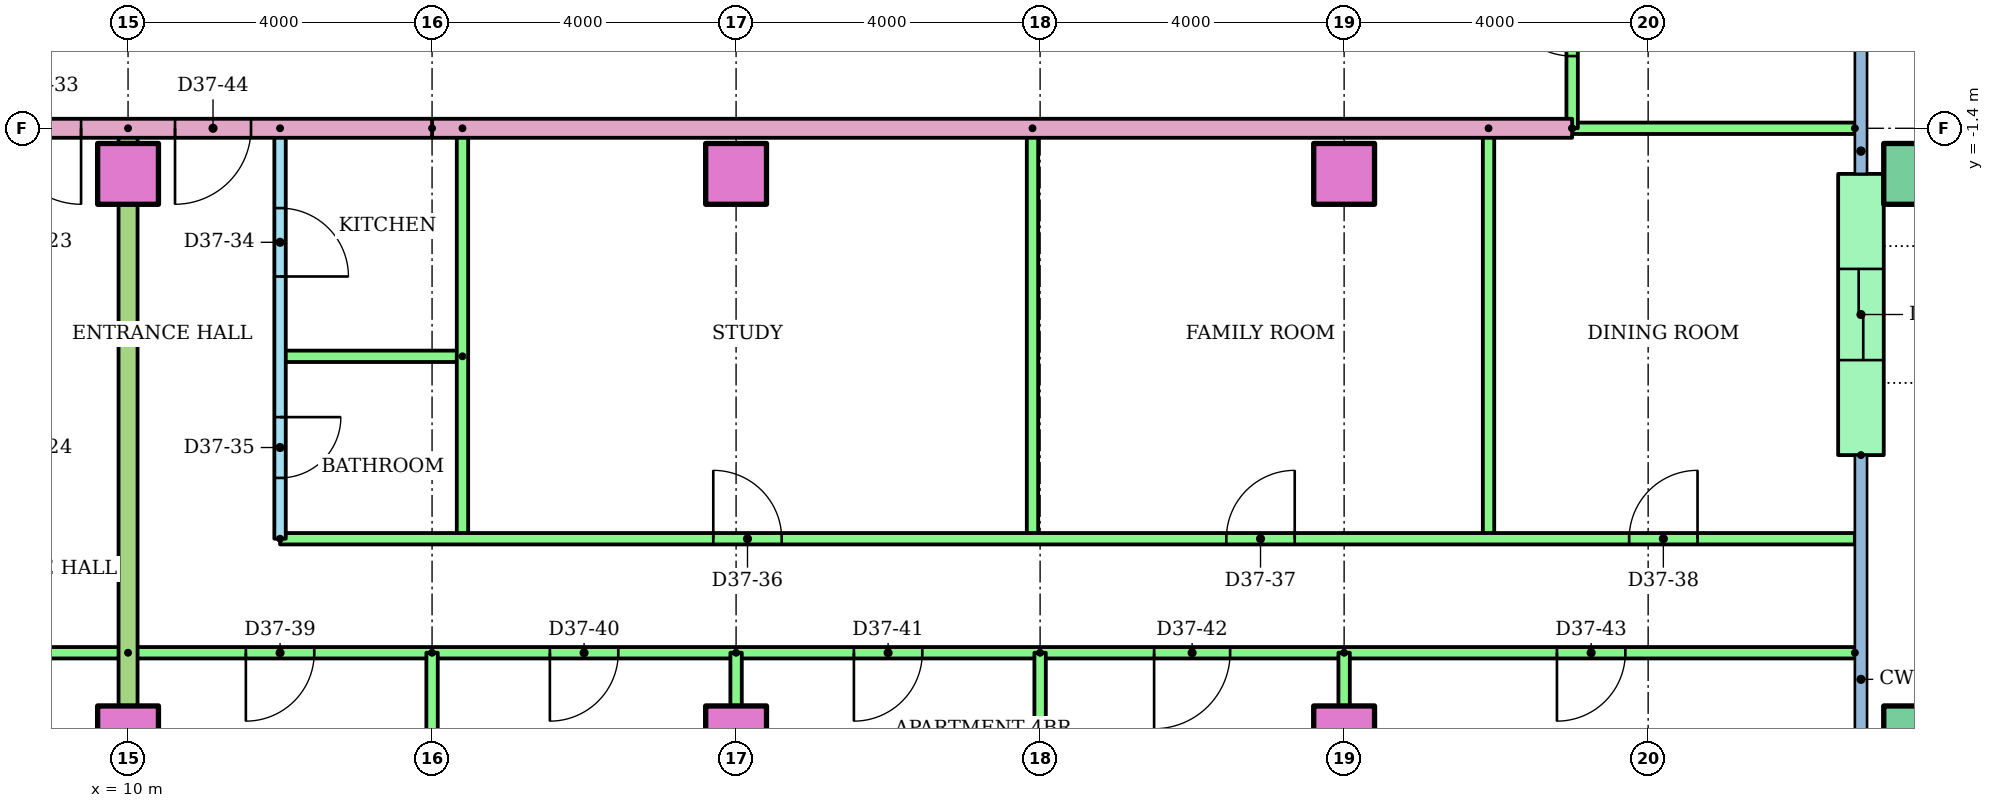
"""IFC4 building model, lengths in metres.
Left out: names, types, materials, properties, quantities, classifications, styles, units other than length and angle.
Written with IfcOpenShell. Run it as: python <this file> out.ifc"""

import sys

from ifc_helpers import new_model, si_unit, direction, frame, frame_2d, origin, origin_2d, place, context, subcontext, project, spatial, rectangle, hollow_rectangle, extrude, element, fill, save


model = new_model("IFC4")
c1 = context("Model", 3, precision=1e-05, world=origin(), true_north=direction((0.0, 1.0)))
c2 = subcontext(c1, "Body", "Model", "MODEL_VIEW")
j1 = project(units=[si_unit("LENGTHUNIT", "METRE"), si_unit("PLANEANGLEUNIT", "RADIAN")], contexts=[c1])
p1 = place(None, origin())
s1 = spatial("IfcSite", under=j1, at=p1, CompositionType="ELEMENT")
p2 = place(p1, origin())
s2 = spatial("IfcBuilding", under=s1, at=p2, CompositionType="ELEMENT")
p3 = place(p2, frame((0.0, 0.0, 142.2)))
s3 = spatial("IfcBuildingStorey", under=s2, at=p3, CompositionType="ELEMENT", Elevation=142.2)
for number, where in (
    (1, (10.0, -9.4, 0.0)),
    (2, (18.0, -9.4, 0.0)),
    (3, (26.0, -9.4, 0.0)),
):
    element("IfcColumn", number, at=place(p3, frame(where)), inside=s3, PredefinedType="COLUMN", context=c2, shape_type="SweptSolid", body=[
        extrude(rectangle(XDim=0.8, YDim=0.8, at=origin_2d()), origin(), (0.0, 0.0, 1.0), 3.2),
    ])
p4 = place(p3, frame((33.5, -9.4, 0.0)))
e4 = element("IfcColumn", 4, at=p4, inside=s3, PredefinedType="COLUMN", context=c2, shape_type="SweptSolid", body=[
    extrude(hollow_rectangle(XDim=0.8, YDim=0.8, WallThickness=0.04, at=origin_2d()), origin(), (0.0, 0.0, 1.0), 3.2),
])
for number, where in (
    (5, (10.0, -2.0, 0.0)),
    (6, (18.0, -2.0, 0.0)),
    (7, (26.0, -2.0, 0.0)),
):
    element("IfcColumn", number, at=place(p3, frame(where)), inside=s3, PredefinedType="COLUMN", context=c2, shape_type="SweptSolid", body=[
        extrude(rectangle(XDim=0.8, YDim=0.8, at=origin_2d()), origin(), (0.0, 0.0, 1.0), 3.2),
    ])
p5 = place(p3, frame((33.5, -2.0, 0.0)))
e8 = element("IfcColumn", 8, at=p5, inside=s3, PredefinedType="COLUMN", context=c2, shape_type="SweptSolid", body=[
    extrude(hollow_rectangle(XDim=0.8, YDim=0.8, WallThickness=0.04, at=origin_2d()), origin(), (0.0, 0.0, 1.0), 3.2),
])
p6 = place(p3, frame((32.8, -5.7, 0.0), z_axis=(0.0, 0.0, 1.0), x_axis=(0.0, 1.0, 0.0)))
e9 = element("IfcWall", 9, at=p6, inside=s3, PredefinedType="STANDARD", context=c2, shape_type="SweptSolid", body=[
    extrude(rectangle(XDim=3.7, YDim=0.6, at=frame_2d((1.85, 0.0))), origin(), (0.0, 0.0, 1.0), 2.92),
])
p7 = place(p6, frame((1.25, 0.0, 0.0)))
e10 = element("IfcOpeningElement", 10, at=p7, cuts=e9, PredefinedType="OPENING", context=c2, shape_type="SweptSolid", body=[
    extrude(rectangle(XDim=1.2, YDim=2.1, at=frame_2d((0.6, 1.05))), frame((0.0, 0.31, 0.0), z_axis=(0.0, -1.0, 0.0), x_axis=(1.0, 0.0, 0.0)), (0.0, 0.0, 1.0), 0.62),
])
p8 = place(p3, frame((10.0, -8.3, 0.0), z_axis=(0.0, 0.0, 1.0), x_axis=(-1.0, 0.0, 0.0)))
e11 = element("IfcWall", 11, at=p8, inside=s3, PredefinedType="PARTITIONING", context=c2, shape_type="SweptSolid", body=[
    extrude(rectangle(XDim=24.0, YDim=0.15, at=frame_2d((12.0, 0.0))), origin(), (0.0, 0.0, 1.0), 2.4),
])
p9 = place(p8, frame((19.5, 0.0, 0.0)))
e12 = element("IfcOpeningElement", 12, at=p9, cuts=e11, PredefinedType="OPENING", context=c2, shape_type="SweptSolid", body=[
    extrude(rectangle(XDim=1.0, YDim=2.1, at=frame_2d((0.5, 1.05))), frame((0.0, 0.085, 0.0), z_axis=(0.0, -1.0, 0.0), x_axis=(1.0, 0.0, 0.0)), (0.0, 0.0, 1.0), 0.17),
])
p10 = place(p8, frame((13.55, 0.0, 0.0)))
e13 = element("IfcOpeningElement", 13, at=p10, cuts=e11, PredefinedType="OPENING", context=c2, shape_type="SweptSolid", body=[
    extrude(rectangle(XDim=0.9, YDim=2.1, at=frame_2d((0.45, 1.05))), frame((0.0, 0.085, 0.0), z_axis=(0.0, -1.0, 0.0), x_axis=(1.0, 0.0, 0.0)), (0.0, 0.0, 1.0), 0.17),
])
p11 = place(p8, frame((9.55, 0.0, 0.0)))
e14 = element("IfcOpeningElement", 14, at=p11, cuts=e11, PredefinedType="OPENING", context=c2, shape_type="SweptSolid", body=[
    extrude(rectangle(XDim=0.9, YDim=2.1, at=frame_2d((0.45, 1.05))), frame((0.0, 0.085, 0.0), z_axis=(0.0, -1.0, 0.0), x_axis=(1.0, 0.0, 0.0)), (0.0, 0.0, 1.0), 0.17),
])
p12 = place(p8, frame((5.55, 0.0, 0.0)))
e15 = element("IfcOpeningElement", 15, at=p12, cuts=e11, PredefinedType="OPENING", context=c2, shape_type="SweptSolid", body=[
    extrude(rectangle(XDim=0.9, YDim=2.1, at=frame_2d((0.45, 1.05))), frame((0.0, 0.085, 0.0), z_axis=(0.0, -1.0, 0.0), x_axis=(1.0, 0.0, 0.0)), (0.0, 0.0, 1.0), 0.17),
])
p13 = place(p8, frame((1.55, 0.0, 0.0)))
e16 = element("IfcOpeningElement", 16, at=p13, cuts=e11, PredefinedType="OPENING", context=c2, shape_type="SweptSolid", body=[
    extrude(rectangle(XDim=0.9, YDim=2.1, at=frame_2d((0.45, 1.05))), frame((0.0, 0.085, 0.0), z_axis=(0.0, -1.0, 0.0), x_axis=(1.0, 0.0, 0.0)), (0.0, 0.0, 1.0), 0.17),
])
p14 = place(p3, frame((12.0, -1.4, 0.0), z_axis=(0.0, 0.0, 1.0), x_axis=(0.0, -1.0, 0.0)))
e17 = element("IfcWall", 17, at=p14, inside=s3, PredefinedType="PARTITIONING", context=c2, shape_type="SweptSolid", body=[
    extrude(rectangle(XDim=5.4, YDim=0.15, at=frame_2d((2.7, 0.0))), origin(), (0.0, 0.0, 1.0), 2.4),
])
p15 = place(p14, frame((1.05, 0.0, 0.0)))
e18 = element("IfcOpeningElement", 18, at=p15, cuts=e17, PredefinedType="OPENING", context=c2, shape_type="SweptSolid", body=[
    extrude(rectangle(XDim=0.9, YDim=2.1, at=frame_2d((0.45, 1.05))), frame((0.0, 0.085, 0.0), z_axis=(0.0, -1.0, 0.0), x_axis=(1.0, 0.0, 0.0)), (0.0, 0.0, 1.0), 0.17),
])
p16 = place(p14, frame((3.8, 0.0, 0.0)))
e19 = element("IfcOpeningElement", 19, at=p16, cuts=e17, PredefinedType="OPENING", context=c2, shape_type="SweptSolid", body=[
    extrude(rectangle(XDim=0.8, YDim=2.1, at=frame_2d((0.4, 1.05))), frame((0.0, 0.085, 0.0), z_axis=(0.0, -1.0, 0.0), x_axis=(1.0, 0.0, 0.0)), (0.0, 0.0, 1.0), 0.17),
])
p17 = place(p3, frame((14.4, -4.4, 0.0), z_axis=(0.0, 0.0, 1.0), x_axis=(-1.0, 0.0, 0.0)))
e20 = element("IfcWall", 20, at=p17, inside=s3, PredefinedType="PARTITIONING", context=c2, shape_type="SweptSolid", body=[
    extrude(rectangle(XDim=2.4, YDim=0.15, at=frame_2d((1.2, 0.0))), origin(), (0.0, 0.0, 1.0), 2.4),
])
for number, where, z_axis, x_axis in (
    (21, (14.4, -1.4, 0.0), (0.0, 0.0, 1.0), (0.0, -1.0, 0.0)),
    (22, (21.9, -1.4, 0.0), (0.0, 0.0, 1.0), (0.0, -1.0, 0.0)),
    (23, (27.9, -1.4, 0.0), (0.0, 0.0, 1.0), (0.0, -1.0, 0.0)),
):
    element("IfcWall", number, at=place(p3, frame(where, z_axis=z_axis, x_axis=x_axis)), inside=s3, PredefinedType="PARTITIONING", context=c2, shape_type="SweptSolid", body=[
        extrude(rectangle(XDim=5.4, YDim=0.15, at=frame_2d((2.7, 0.0))), origin(), (0.0, 0.0, 1.0), 2.4),
    ])
p18 = place(p3, frame((12.0, -6.8, 0.0)))
e24 = element("IfcWall", 24, at=p18, inside=s3, PredefinedType="PARTITIONING", context=c2, shape_type="SweptSolid", body=[
    extrude(rectangle(XDim=20.72, YDim=0.15, at=frame_2d((10.36, 0.0))), origin(), (0.0, 0.0, 1.0), 2.4),
])
p19 = place(p18, frame((5.7, 0.0, 0.0)))
e25 = element("IfcOpeningElement", 25, at=p19, cuts=e24, PredefinedType="OPENING", context=c2, shape_type="SweptSolid", body=[
    extrude(rectangle(XDim=0.9, YDim=2.1, at=frame_2d((0.45, 1.05))), frame((0.0, 0.085, 0.0), z_axis=(0.0, -1.0, 0.0), x_axis=(1.0, 0.0, 0.0)), (0.0, 0.0, 1.0), 0.17),
])
p20 = place(p18, frame((12.45, 0.0, 0.0)))
e26 = element("IfcOpeningElement", 26, at=p20, cuts=e24, PredefinedType="OPENING", context=c2, shape_type="SweptSolid", body=[
    extrude(rectangle(XDim=0.9, YDim=2.1, at=frame_2d((0.45, 1.05))), frame((0.0, 0.085, 0.0), z_axis=(0.0, -1.0, 0.0), x_axis=(1.0, 0.0, 0.0)), (0.0, 0.0, 1.0), 0.17),
])
p21 = place(p18, frame((17.75, 0.0, 0.0)))
e27 = element("IfcOpeningElement", 27, at=p21, cuts=e24, PredefinedType="OPENING", context=c2, shape_type="SweptSolid", body=[
    extrude(rectangle(XDim=0.9, YDim=2.1, at=frame_2d((0.45, 1.05))), frame((0.0, 0.085, 0.0), z_axis=(0.0, -1.0, 0.0), x_axis=(1.0, 0.0, 0.0)), (0.0, 0.0, 1.0), 0.17),
])
p22 = place(p3, frame((32.72, -8.3, 0.0), z_axis=(0.0, 0.0, 1.0), x_axis=(-1.0, 0.0, 0.0)))
e28 = element("IfcWall", 28, at=p22, inside=s3, PredefinedType="PARTITIONING", context=c2, shape_type="SweptSolid", body=[
    extrude(rectangle(XDim=22.72, YDim=0.15, at=frame_2d((11.36, 0.0))), origin(), (0.0, 0.0, 1.0), 2.4),
])
p23 = place(p22, frame((20.27, 0.0, 0.0)))
e29 = element("IfcOpeningElement", 29, at=p23, cuts=e28, PredefinedType="OPENING", context=c2, shape_type="SweptSolid", body=[
    extrude(rectangle(XDim=0.9, YDim=2.1, at=frame_2d((0.45, 1.05))), frame((0.0, 0.085, 0.0), z_axis=(0.0, -1.0, 0.0), x_axis=(1.0, 0.0, 0.0)), (0.0, 0.0, 1.0), 0.17),
])
p24 = place(p22, frame((16.27, 0.0, 0.0)))
e30 = element("IfcOpeningElement", 30, at=p24, cuts=e28, PredefinedType="OPENING", context=c2, shape_type="SweptSolid", body=[
    extrude(rectangle(XDim=0.9, YDim=2.1, at=frame_2d((0.45, 1.05))), frame((0.0, 0.085, 0.0), z_axis=(0.0, -1.0, 0.0), x_axis=(1.0, 0.0, 0.0)), (0.0, 0.0, 1.0), 0.17),
])
p25 = place(p22, frame((12.27, 0.0, 0.0)))
e31 = element("IfcOpeningElement", 31, at=p25, cuts=e28, PredefinedType="OPENING", context=c2, shape_type="SweptSolid", body=[
    extrude(rectangle(XDim=0.9, YDim=2.1, at=frame_2d((0.45, 1.05))), frame((0.0, 0.085, 0.0), z_axis=(0.0, -1.0, 0.0), x_axis=(1.0, 0.0, 0.0)), (0.0, 0.0, 1.0), 0.17),
])
p26 = place(p22, frame((8.22, 0.0, 0.0)))
e32 = element("IfcOpeningElement", 32, at=p26, cuts=e28, PredefinedType="OPENING", context=c2, shape_type="SweptSolid", body=[
    extrude(rectangle(XDim=1.0, YDim=2.1, at=frame_2d((0.5, 1.05))), frame((0.0, 0.085, 0.0), z_axis=(0.0, -1.0, 0.0), x_axis=(1.0, 0.0, 0.0)), (0.0, 0.0, 1.0), 0.17),
])
p27 = place(p22, frame((3.02, 0.0, 0.0)))
e33 = element("IfcOpeningElement", 33, at=p27, cuts=e28, PredefinedType="OPENING", context=c2, shape_type="SweptSolid", body=[
    extrude(rectangle(XDim=0.9, YDim=2.1, at=frame_2d((0.45, 1.05))), frame((0.0, 0.085, 0.0), z_axis=(0.0, -1.0, 0.0), x_axis=(1.0, 0.0, 0.0)), (0.0, 0.0, 1.0), 0.17),
])
p28 = place(p3, frame((14.0, -8.3, 0.0), z_axis=(0.0, 0.0, 1.0), x_axis=(0.0, -1.0, 0.0)))
e34 = element("IfcWall", 34, at=p28, inside=s3, PredefinedType="PARTITIONING", context=c2, shape_type="SweptSolid", body=[
    extrude(rectangle(XDim=8.021, YDim=0.15, at=frame_2d((4.01, 0.0))), origin(), (0.0, 0.0, 1.0), 2.4),
])
p29 = place(p3, frame((18.0, -8.3, 0.0), z_axis=(0.0, 0.0, 1.0), x_axis=(0.0, -1.0, 0.0)))
e35 = element("IfcWall", 35, at=p29, inside=s3, PredefinedType="PARTITIONING", context=c2, shape_type="SweptSolid", body=[
    extrude(rectangle(XDim=8.01, YDim=0.15, at=frame_2d((4.005, 0.0))), origin(), (0.0, 0.0, 1.0), 2.4),
])
p30 = place(p3, frame((22.0, -8.3, 0.0), z_axis=(0.0, 0.0, 1.0), x_axis=(0.0, -1.0, 0.0)))
e36 = element("IfcWall", 36, at=p30, inside=s3, PredefinedType="PARTITIONING", context=c2, shape_type="SweptSolid", body=[
    extrude(rectangle(XDim=8.021, YDim=0.15, at=frame_2d((4.01, 0.0))), origin(), (0.0, 0.0, 1.0), 2.4),
])
p31 = place(p3, frame((26.0, -8.3, 0.0), z_axis=(0.0, 0.0, 1.0), x_axis=(0.0, -1.0, 0.0)))
e37 = element("IfcWall", 37, at=p31, inside=s3, PredefinedType="PARTITIONING", context=c2, shape_type="SweptSolid", body=[
    extrude(rectangle(XDim=8.01, YDim=0.15, at=frame_2d((4.005, 0.0))), origin(), (0.0, 0.0, 1.0), 2.4),
])
p32 = place(p3, frame((10.0, -1.4, 0.0), z_axis=(0.0, 0.0, 1.0), x_axis=(0.0, -1.0, 0.0)))
e38 = element("IfcWall", 38, at=p32, inside=s3, PredefinedType="PARTITIONING", context=c2, shape_type="SweptSolid", body=[
    extrude(rectangle(XDim=14.91, YDim=0.25, at=frame_2d((7.455, 0.0))), origin(), (0.0, 0.0, 1.0), 2.4),
])
p33 = place(p3, frame((29.0, -1.4, 0.0), z_axis=(0.0, 0.0, 1.0), x_axis=(-1.0, 0.0, 0.0)))
e39 = element("IfcWall", 39, at=p33, inside=s3, PredefinedType="PARTITIONING", context=c2, shape_type="SweptSolid", body=[
    extrude(rectangle(XDim=15.0, YDim=0.25, at=frame_2d((7.5, 0.0))), origin(), (0.0, 0.0, 1.0), 2.4),
])
p34 = place(p3, frame((32.72, -1.4, 0.0), z_axis=(0.0, 0.0, 1.0), x_axis=(-1.0, 0.0, 0.0)))
e40 = element("IfcWall", 40, at=p34, inside=s3, PredefinedType="PARTITIONING", context=c2, shape_type="SweptSolid", body=[
    extrude(rectangle(XDim=3.72, YDim=0.15, at=frame_2d((1.86, 0.0))), origin(), (0.0, 0.0, 1.0), 2.4),
])
p35 = place(p3, frame((29.0, -1.4, 0.0), z_axis=(0.0, 0.0, 1.0), x_axis=(0.0, 1.0, 0.0)))
e41 = element("IfcWall", 41, at=p35, inside=s3, PredefinedType="PARTITIONING", context=c2, shape_type="SweptSolid", body=[
    extrude(rectangle(XDim=2.8, YDim=0.15, at=frame_2d((1.4, 0.0))), origin(), (0.0, 0.0, 1.0), 2.4),
])
p36 = place(p35, frame((0.95, 0.0, 0.0)))
e42 = element("IfcOpeningElement", 42, at=p36, cuts=e41, PredefinedType="OPENING", context=c2, shape_type="SweptSolid", body=[
    extrude(rectangle(XDim=0.9, YDim=2.1, at=frame_2d((0.45, 1.05))), frame((0.0, 0.085, 0.0), z_axis=(0.0, -1.0, 0.0), x_axis=(1.0, 0.0, 0.0)), (0.0, 0.0, 1.0), 0.17),
])
p37 = place(p3, frame((14.0, -1.4, 0.0), z_axis=(0.0, 0.0, 1.0), x_axis=(-1.0, 0.0, 0.0)))
e43 = element("IfcWall", 43, at=p37, inside=s3, PredefinedType="PARTITIONING", context=c2, shape_type="SweptSolid", body=[
    extrude(rectangle(XDim=28.0, YDim=0.25, at=frame_2d((14.0, 0.0))), origin(), (0.0, 0.0, 1.0), 2.4),
])
p38 = place(p37, frame((4.618, 0.0, 0.0)))
e44 = element("IfcOpeningElement", 44, at=p38, cuts=e43, PredefinedType="OPENING", context=c2, shape_type="SweptSolid", body=[
    extrude(rectangle(XDim=1.0, YDim=2.1, at=frame_2d((0.5, 1.05))), frame((0.0, 0.135, 0.0), z_axis=(0.0, -1.0, 0.0), x_axis=(1.0, 0.0, 0.0)), (0.0, 0.0, 1.0), 0.27),
])
p39 = place(p37, frame((2.382, 0.0, 0.0)))
e45 = element("IfcOpeningElement", 45, at=p39, cuts=e43, PredefinedType="OPENING", context=c2, shape_type="SweptSolid", body=[
    extrude(rectangle(XDim=1.0, YDim=2.1, at=frame_2d((0.5, 1.05))), frame((0.0, 0.135, 0.0), z_axis=(0.0, -1.0, 0.0), x_axis=(1.0, 0.0, 0.0)), (0.0, 0.0, 1.0), 0.27),
])
p40 = place(p38, origin())
e46 = element("IfcDoor", 46, at=p40, inside=s3, OperationType="SINGLE_SWING_LEFT", PredefinedType="DOOR", context=c2, shape_type="SweptSolid", body=[
    extrude(rectangle(XDim=1.0, YDim=2.1, at=frame_2d((0.5, 1.05))), frame((0.0, 0.025, 0.0), z_axis=(0.0, -1.0, 0.0), x_axis=(1.0, 0.0, 0.0)), (0.0, 0.0, 1.0), 0.05),
])
fill(e44, e46)
p41 = place(p15, origin())
e47 = element("IfcDoor", 47, at=p41, inside=s3, OperationType="SINGLE_SWING_RIGHT", PredefinedType="DOOR", context=c2, shape_type="SweptSolid", body=[
    extrude(rectangle(XDim=0.9, YDim=2.1, at=frame_2d((0.45, 1.05))), frame((0.0, 0.025, 0.0), z_axis=(0.0, -1.0, 0.0), x_axis=(1.0, 0.0, 0.0)), (0.0, 0.0, 1.0), 0.05),
])
fill(e18, e47)
p42 = place(p16, origin())
e48 = element("IfcDoor", 48, at=p42, inside=s3, OperationType="SINGLE_SWING_LEFT", PredefinedType="DOOR", context=c2, shape_type="SweptSolid", body=[
    extrude(rectangle(XDim=0.8, YDim=2.1, at=frame_2d((0.4, 1.05))), frame((0.0, 0.025, 0.0), z_axis=(0.0, -1.0, 0.0), x_axis=(1.0, 0.0, 0.0)), (0.0, 0.0, 1.0), 0.05),
])
fill(e19, e48)
p43 = place(p19, origin())
e49 = element("IfcDoor", 49, at=p43, inside=s3, OperationType="SINGLE_SWING_LEFT", PredefinedType="DOOR", context=c2, shape_type="SweptSolid", body=[
    extrude(rectangle(XDim=0.9, YDim=2.1, at=frame_2d((0.45, 1.05))), frame((0.0, 0.025, 0.0), z_axis=(0.0, -1.0, 0.0), x_axis=(1.0, 0.0, 0.0)), (0.0, 0.0, 1.0), 0.05),
])
fill(e25, e49)
p44 = place(p20, origin())
e50 = element("IfcDoor", 50, at=p44, inside=s3, OperationType="SINGLE_SWING_RIGHT", PredefinedType="DOOR", context=c2, shape_type="SweptSolid", body=[
    extrude(rectangle(XDim=0.9, YDim=2.1, at=frame_2d((0.45, 1.05))), frame((0.0, 0.025, 0.0), z_axis=(0.0, -1.0, 0.0), x_axis=(1.0, 0.0, 0.0)), (0.0, 0.0, 1.0), 0.05),
])
fill(e26, e50)
p45 = place(p21, origin())
e51 = element("IfcDoor", 51, at=p45, inside=s3, OperationType="SINGLE_SWING_RIGHT", PredefinedType="DOOR", context=c2, shape_type="SweptSolid", body=[
    extrude(rectangle(XDim=0.9, YDim=2.1, at=frame_2d((0.45, 1.05))), frame((0.0, 0.025, 0.0), z_axis=(0.0, -1.0, 0.0), x_axis=(1.0, 0.0, 0.0)), (0.0, 0.0, 1.0), 0.05),
])
fill(e27, e51)
p46 = place(p23, origin())
e52 = element("IfcDoor", 52, at=p46, inside=s3, OperationType="SINGLE_SWING_RIGHT", PredefinedType="DOOR", context=c2, shape_type="SweptSolid", body=[
    extrude(rectangle(XDim=0.9, YDim=2.1, at=frame_2d((0.45, 1.05))), frame((0.0, 0.025, 0.0), z_axis=(0.0, -1.0, 0.0), x_axis=(1.0, 0.0, 0.0)), (0.0, 0.0, 1.0), 0.05),
])
fill(e29, e52)
p47 = place(p24, origin())
e53 = element("IfcDoor", 53, at=p47, inside=s3, OperationType="SINGLE_SWING_RIGHT", PredefinedType="DOOR", context=c2, shape_type="SweptSolid", body=[
    extrude(rectangle(XDim=0.9, YDim=2.1, at=frame_2d((0.45, 1.05))), frame((0.0, 0.025, 0.0), z_axis=(0.0, -1.0, 0.0), x_axis=(1.0, 0.0, 0.0)), (0.0, 0.0, 1.0), 0.05),
])
fill(e30, e53)
p48 = place(p25, origin())
e54 = element("IfcDoor", 54, at=p48, inside=s3, OperationType="SINGLE_SWING_RIGHT", PredefinedType="DOOR", context=c2, shape_type="SweptSolid", body=[
    extrude(rectangle(XDim=0.9, YDim=2.1, at=frame_2d((0.45, 1.05))), frame((0.0, 0.025, 0.0), z_axis=(0.0, -1.0, 0.0), x_axis=(1.0, 0.0, 0.0)), (0.0, 0.0, 1.0), 0.05),
])
fill(e31, e54)
p49 = place(p26, origin())
e55 = element("IfcDoor", 55, at=p49, inside=s3, OperationType="SINGLE_SWING_RIGHT", PredefinedType="DOOR", context=c2, shape_type="SweptSolid", body=[
    extrude(rectangle(XDim=1.0, YDim=2.1, at=frame_2d((0.5, 1.05))), frame((0.0, 0.025, 0.0), z_axis=(0.0, -1.0, 0.0), x_axis=(1.0, 0.0, 0.0)), (0.0, 0.0, 1.0), 0.05),
])
fill(e32, e55)
p50 = place(p27, origin())
e56 = element("IfcDoor", 56, at=p50, inside=s3, OperationType="SINGLE_SWING_RIGHT", PredefinedType="DOOR", context=c2, shape_type="SweptSolid", body=[
    extrude(rectangle(XDim=0.9, YDim=2.1, at=frame_2d((0.45, 1.05))), frame((0.0, 0.025, 0.0), z_axis=(0.0, -1.0, 0.0), x_axis=(1.0, 0.0, 0.0)), (0.0, 0.0, 1.0), 0.05),
])
fill(e33, e56)
p51 = place(p39, origin())
e57 = element("IfcDoor", 57, at=p51, inside=s3, OperationType="SINGLE_SWING_RIGHT", PredefinedType="DOOR", context=c2, shape_type="SweptSolid", body=[
    extrude(rectangle(XDim=1.0, YDim=2.1, at=frame_2d((0.5, 1.05))), frame((0.0, 0.025, 0.0), z_axis=(0.0, -1.0, 0.0), x_axis=(1.0, 0.0, 0.0)), (0.0, 0.0, 1.0), 0.05),
])
fill(e45, e57)
p52 = place(p36, origin())
e58 = element("IfcDoor", 58, at=p52, inside=s3, OperationType="SINGLE_SWING_RIGHT", PredefinedType="DOOR", context=c2, shape_type="SweptSolid", body=[
    extrude(rectangle(XDim=0.9, YDim=2.1, at=frame_2d((0.45, 1.05))), frame((0.0, 0.025, 0.0), z_axis=(0.0, -1.0, 0.0), x_axis=(1.0, 0.0, 0.0)), (0.0, 0.0, 1.0), 0.05),
])
fill(e42, e58)
p53 = place(p7, origin())
e59 = element("IfcDoor", 59, at=p53, inside=s3, OperationType="SLIDING_TO_LEFT", PredefinedType="DOOR", context=c2, shape_type="SweptSolid", body=[
    extrude(rectangle(XDim=1.2, YDim=2.1, at=frame_2d((0.6, 1.05))), frame((0.0, 0.025, 0.0), z_axis=(0.0, -1.0, 0.0), x_axis=(1.0, 0.0, 0.0)), (0.0, 0.0, 1.0), 0.05),
])
fill(e10, e59)
save(model, sys.argv[1])
